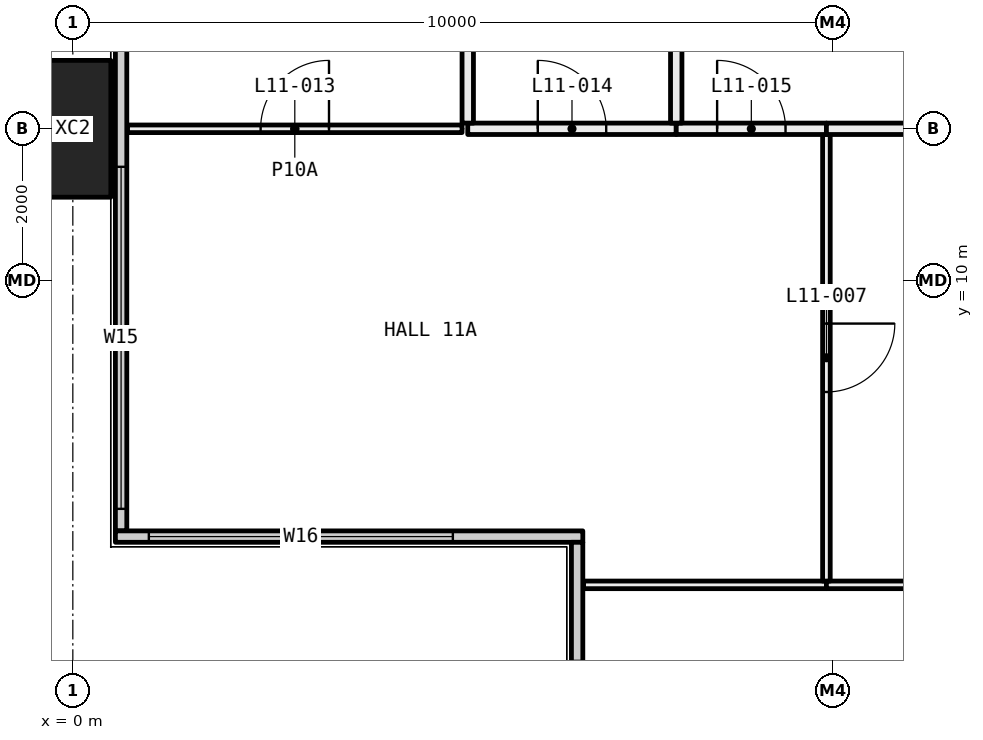
"""IFC4 building model, lengths in metres.
Left out: names, types, materials, properties, quantities, classifications, styles, units other than length and angle.
Written with IfcOpenShell. Run it as: python <this file> out.ifc"""

import sys

from ifc_helpers import new_model, si_unit, direction, frame, frame_2d, origin, origin_2d, place, context, subcontext, project, spatial, rectangle, hollow_rectangle, extrude, element, fill, save


model = new_model("IFC4")
c1 = context("Model", 3, precision=1e-05, world=origin(), true_north=direction((0.0, 1.0)))
c2 = subcontext(c1, "Body", "Model", "MODEL_VIEW")
j1 = project(units=[si_unit("LENGTHUNIT", "METRE"), si_unit("PLANEANGLEUNIT", "RADIAN")], contexts=[c1])
p1 = place(None, origin())
s1 = spatial("IfcSite", under=j1, at=p1, CompositionType="ELEMENT")
p2 = place(p1, origin())
s2 = spatial("IfcBuilding", under=s1, at=p2, CompositionType="ELEMENT")
p3 = place(p2, frame((0.0, 0.0, 50.7)))
s3 = spatial("IfcBuildingStorey", under=s2, at=p3, CompositionType="ELEMENT", Elevation=50.7)
p4 = place(p3, frame((0.0, 12.0, -0.4), z_axis=(0.0, 0.0, 1.0), x_axis=(0.0, 1.0, 0.0)))
e1 = element("IfcColumn", 1, at=p4, inside=s3, PredefinedType="COLUMN", context=c2, shape_type="SweptSolid", body=[
    extrude(hollow_rectangle(XDim=1.8, YDim=1.0, WallThickness=0.07, at=origin_2d()), origin(), (0.0, 0.0, 1.0), 3.45),
])
p5 = place(p3, frame((0.635, 6.71, 0.0), z_axis=(0.0, 0.0, 1.0), x_axis=(0.0, 1.0, 0.0)))
e2 = element("IfcWall", 2, at=p5, inside=s3, PredefinedType="ELEMENTEDWALL", context=c2, shape_type="SweptSolid", body=[
    extrude(rectangle(XDim=34.58, YDim=0.15, at=frame_2d((17.29, 0.0))), origin(), (0.0, 0.0, 1.0), 3.05),
])
p6 = place(p5, frame((0.29, 0.0, 0.45)))
e3 = element("IfcOpeningElement", 3, at=p6, cuts=e2, PredefinedType="OPENING", context=c2, shape_type="SweptSolid", body=[
    extrude(rectangle(XDim=4.5, YDim=2.55, at=frame_2d((2.25, 1.275))), frame((0.0, 0.085, 0.0), z_axis=(0.0, -1.0, 0.0), x_axis=(1.0, 0.0, 0.0)), (0.0, 0.0, 1.0), 0.17),
])
p7 = place(p5, frame((7.79, 0.0, 0.45)))
e4 = element("IfcOpeningElement", 4, at=p7, cuts=e2, PredefinedType="OPENING", context=c2, shape_type="SweptSolid", body=[
    extrude(rectangle(XDim=3.0, YDim=2.55, at=frame_2d((1.5, 1.275))), frame((0.0, 0.085, 0.0), z_axis=(0.0, -1.0, 0.0), x_axis=(1.0, 0.0, 0.0)), (0.0, 0.0, 1.0), 0.17),
])
p8 = place(p5, frame((11.79, 0.0, 0.45)))
e5 = element("IfcOpeningElement", 5, at=p8, cuts=e2, PredefinedType="OPENING", context=c2, shape_type="SweptSolid", body=[
    extrude(rectangle(XDim=3.0, YDim=2.55, at=frame_2d((1.5, 1.275))), frame((0.0, 0.085, 0.0), z_axis=(0.0, -1.0, 0.0), x_axis=(1.0, 0.0, 0.0)), (0.0, 0.0, 1.0), 0.17),
])
p9 = place(p5, frame((19.79, 0.0, 0.45)))
e6 = element("IfcOpeningElement", 6, at=p9, cuts=e2, PredefinedType="OPENING", context=c2, shape_type="SweptSolid", body=[
    extrude(rectangle(XDim=3.0, YDim=2.55, at=frame_2d((1.5, 1.275))), frame((0.0, 0.085, 0.0), z_axis=(0.0, -1.0, 0.0), x_axis=(1.0, 0.0, 0.0)), (0.0, 0.0, 1.0), 0.17),
])
p10 = place(p5, frame((23.79, 0.0, 0.45)))
e7 = element("IfcOpeningElement", 7, at=p10, cuts=e2, PredefinedType="OPENING", context=c2, shape_type="SweptSolid", body=[
    extrude(rectangle(XDim=2.0, YDim=2.55, at=frame_2d((1.0, 1.275))), frame((0.0, 0.085, 0.0), z_axis=(0.0, -1.0, 0.0), x_axis=(1.0, 0.0, 0.0)), (0.0, 0.0, 1.0), 0.17),
])
p11 = place(p5, frame((29.79, 0.0, 0.45)))
e8 = element("IfcOpeningElement", 8, at=p11, cuts=e2, PredefinedType="OPENING", context=c2, shape_type="SweptSolid", body=[
    extrude(rectangle(XDim=4.5, YDim=2.55, at=frame_2d((2.25, 1.275))), frame((0.0, 0.085, 0.0), z_axis=(0.0, -1.0, 0.0), x_axis=(1.0, 0.0, 0.0)), (0.0, 0.0, 1.0), 0.17),
])
p12 = place(p3, frame((0.56, 6.635, 0.0), z_axis=(0.0, 0.0, 1.0), x_axis=(1.0, 0.0, 0.0)))
e9 = element("IfcWall", 9, at=p12, inside=s3, PredefinedType="ELEMENTEDWALL", context=c2, shape_type="SweptSolid", body=[
    extrude(rectangle(XDim=6.15, YDim=0.15, at=frame_2d((3.075, 0.0))), origin(), (0.0, 0.0, 1.0), 3.05),
])
p13 = place(p12, frame((0.44, 0.0, 0.45)))
e10 = element("IfcOpeningElement", 10, at=p13, cuts=e9, PredefinedType="OPENING", context=c2, shape_type="SweptSolid", body=[
    extrude(rectangle(XDim=4.0, YDim=2.55, at=frame_2d((2.0, 1.275))), frame((0.0, 0.085, 0.0), z_axis=(0.0, -1.0, 0.0), x_axis=(1.0, 0.0, 0.0)), (0.0, 0.0, 1.0), 0.17),
])
p14 = place(p3, frame((6.635, 0.71, 0.0), z_axis=(0.0, 0.0, 1.0), x_axis=(0.0, 1.0, 0.0)))
e11 = element("IfcWall", 11, at=p14, inside=s3, PredefinedType="ELEMENTEDWALL", context=c2, shape_type="SweptSolid", body=[
    extrude(rectangle(XDim=5.85, YDim=0.15, at=frame_2d((2.925, 0.0))), origin(), (0.0, 0.0, 1.0), 3.05),
])
p15 = place(p14, frame((0.29, 0.0, 0.45)))
e12 = element("IfcOpeningElement", 12, at=p15, cuts=e11, PredefinedType="OPENING", context=c2, shape_type="SweptSolid", body=[
    extrude(rectangle(XDim=4.0, YDim=2.55, at=frame_2d((2.0, 1.275))), frame((0.0, 0.085, 0.0), z_axis=(0.0, -1.0, 0.0), x_axis=(1.0, 0.0, 0.0)), (0.0, 0.0, 1.0), 0.17),
])
p16 = place(p3, frame((9.915, 6.0, 0.0), z_axis=(0.0, 0.0, 1.0), x_axis=(-1.0, 0.0, 0.0)))
e13 = element("IfcWall", 13, at=p16, inside=s3, PredefinedType="PARTITIONING", context=c2, shape_type="SweptSolid", body=[
    extrude(rectangle(XDim=3.195, YDim=0.1, at=frame_2d((1.598, 0.0))), origin(), (0.0, 0.0, 1.0), 3.05),
])
p17 = place(p3, frame((11.95, 6.0, 0.0), z_axis=(0.0, 0.0, 1.0), x_axis=(-1.0, 0.0, 0.0)))
e14 = element("IfcWall", 14, at=p17, inside=s3, PredefinedType="PARTITIONING", context=c2, shape_type="SweptSolid", body=[
    extrude(rectangle(XDim=2.035, YDim=0.1, at=frame_2d((1.018, 0.0))), origin(), (0.0, 0.0, 1.0), 2.45),
])
p18 = place(p3, frame((9.915, 6.05, 0.0), z_axis=(0.0, 0.0, 1.0), x_axis=(0.0, 1.0, 0.0)))
e15 = element("IfcWall", 15, at=p18, inside=s3, PredefinedType="PARTITIONING", context=c2, shape_type="SweptSolid", body=[
    extrude(rectangle(XDim=5.875, YDim=0.1, at=frame_2d((2.938, 0.0))), origin(), (0.0, 0.0, 1.0), 2.45),
])
p19 = place(p18, frame((2.488, 0.0, 0.0)))
e16 = element("IfcOpeningElement", 16, at=p19, cuts=e15, PredefinedType="OPENING", context=c2, shape_type="SweptSolid", body=[
    extrude(rectangle(XDim=0.9, YDim=2.1, at=frame_2d((0.45, 1.05))), frame((0.0, 0.06, 0.0), z_axis=(0.0, -1.0, 0.0), x_axis=(1.0, 0.0, 0.0)), (0.0, 0.0, 1.0), 0.12),
])
p20 = place(p3, frame((5.121, 12.0, 0.0), z_axis=(0.0, 0.0, 1.0), x_axis=(-1.0, 0.0, 0.0)))
e17 = element("IfcWall", 17, at=p20, inside=s3, PredefinedType="PARTITIONING", context=c2, shape_type="SweptSolid", body=[
    extrude(rectangle(XDim=4.401, YDim=0.1, at=frame_2d((2.201, 0.0))), origin(), (0.0, 0.0, 1.0), 2.45),
])
p21 = place(p20, frame((1.75, 0.0, 0.0)))
e18 = element("IfcOpeningElement", 18, at=p21, cuts=e17, PredefinedType="OPENING", context=c2, shape_type="SweptSolid", body=[
    extrude(rectangle(XDim=0.9, YDim=2.1, at=frame_2d((0.45, 1.05))), frame((0.0, 0.06, 0.0), z_axis=(0.0, -1.0, 0.0), x_axis=(1.0, 0.0, 0.0)), (0.0, 0.0, 1.0), 0.12),
])
p22 = place(p3, frame((7.939, 12.0, 0.0), z_axis=(0.0, 0.0, 1.0), x_axis=(-1.0, 0.0, 0.0)))
e19 = element("IfcWall", 19, at=p22, inside=s3, PredefinedType="PARTITIONING", context=c2, shape_type="SweptSolid", body=[
    extrude(rectangle(XDim=2.743, YDim=0.15, at=frame_2d((1.372, 0.0))), origin(), (0.0, 0.0, 1.0), 2.45),
])
p23 = place(p22, frame((0.921, 0.0, 0.0)))
e20 = element("IfcOpeningElement", 20, at=p23, cuts=e19, PredefinedType="OPENING", context=c2, shape_type="SweptSolid", body=[
    extrude(rectangle(XDim=0.9, YDim=2.1, at=frame_2d((0.45, 1.05))), frame((0.0, 0.085, 0.0), z_axis=(0.0, -1.0, 0.0), x_axis=(1.0, 0.0, 0.0)), (0.0, 0.0, 1.0), 0.17),
])
p24 = place(p3, frame((9.915, 12.0, 0.0), z_axis=(0.0, 0.0, 1.0), x_axis=(-1.0, 0.0, 0.0)))
e21 = element("IfcWall", 21, at=p24, inside=s3, PredefinedType="PARTITIONING", context=c2, shape_type="SweptSolid", body=[
    extrude(rectangle(XDim=1.976, YDim=0.15, at=frame_2d((0.988, 0.0))), origin(), (0.0, 0.0, 1.0), 2.45),
])
p25 = place(p24, frame((0.538, 0.0, 0.0)))
e22 = element("IfcOpeningElement", 22, at=p25, cuts=e21, PredefinedType="OPENING", context=c2, shape_type="SweptSolid", body=[
    extrude(rectangle(XDim=0.9, YDim=2.1, at=frame_2d((0.45, 1.05))), frame((0.0, 0.085, 0.0), z_axis=(0.0, -1.0, 0.0), x_axis=(1.0, 0.0, 0.0)), (0.0, 0.0, 1.0), 0.17),
])
p26 = place(p3, frame((11.2, 12.0, 0.0), z_axis=(0.0, 0.0, 1.0), x_axis=(-1.0, 0.0, 0.0)))
e23 = element("IfcWall", 23, at=p26, inside=s3, PredefinedType="PARTITIONING", context=c2, shape_type="SweptSolid", body=[
    extrude(rectangle(XDim=1.285, YDim=0.15, at=frame_2d((0.643, 0.0))), origin(), (0.0, 0.0, 1.0), 2.45),
])
p27 = place(p3, frame((5.196, 12.075, 0.0), z_axis=(0.0, 0.0, 1.0), x_axis=(0.0, 1.0, 0.0)))
e24 = element("IfcWall", 24, at=p27, inside=s3, PredefinedType="PARTITIONING", context=c2, shape_type="SweptSolid", body=[
    extrude(rectangle(XDim=5.825, YDim=0.15, at=frame_2d((2.913, 0.0))), origin(), (0.0, 0.0, 1.0), 2.45),
])
p28 = place(p3, frame((7.939, 12.075, 0.0), z_axis=(0.0, 0.0, 1.0), x_axis=(0.0, 1.0, 0.0)))
e25 = element("IfcWall", 25, at=p28, inside=s3, PredefinedType="PARTITIONING", context=c2, shape_type="SweptSolid", body=[
    extrude(rectangle(XDim=2.637, YDim=0.15, at=frame_2d((1.318, 0.0))), origin(), (0.0, 0.0, 1.0), 2.45),
])
p29 = place(p6, origin())
e26 = element("IfcWindow", 26, at=p29, inside=s3, PartitioningType="SINGLE_PANEL", PredefinedType="WINDOW", context=c2, shape_type="SweptSolid", body=[
    extrude(rectangle(XDim=4.5, YDim=2.55, at=frame_2d((2.25, 1.275))), frame((0.0, 0.03, 0.0), z_axis=(0.0, -1.0, 0.0), x_axis=(1.0, 0.0, 0.0)), (0.0, 0.0, 1.0), 0.06),
])
fill(e3, e26)
p30 = place(p13, origin())
e27 = element("IfcWindow", 27, at=p30, inside=s3, PartitioningType="SINGLE_PANEL", PredefinedType="WINDOW", context=c2, shape_type="SweptSolid", body=[
    extrude(rectangle(XDim=4.0, YDim=2.55, at=frame_2d((2.0, 1.275))), frame((0.0, 0.03, 0.0), z_axis=(0.0, -1.0, 0.0), x_axis=(1.0, 0.0, 0.0)), (0.0, 0.0, 1.0), 0.06),
])
fill(e10, e27)
p31 = place(p19, frame((0.9, 0.0, 0.0), x_axis=(-1.0, 0.0, 0.0)))
e28 = element("IfcDoor", 28, at=p31, inside=s3, OperationType="SINGLE_SWING_RIGHT", PredefinedType="DOOR", context=c2, shape_type="SweptSolid", body=[
    extrude(rectangle(XDim=0.9, YDim=2.1, at=frame_2d((0.45, 1.05))), frame((0.0, 0.025, 0.0), z_axis=(0.0, -1.0, 0.0), x_axis=(1.0, 0.0, 0.0)), (0.0, 0.0, 1.0), 0.05),
])
fill(e16, e28)
p32 = place(p21, frame((0.9, 0.0, 0.0), x_axis=(-1.0, 0.0, 0.0)))
e29 = element("IfcDoor", 29, at=p32, inside=s3, OperationType="SINGLE_SWING_LEFT", PredefinedType="DOOR", context=c2, shape_type="SweptSolid", body=[
    extrude(rectangle(XDim=0.9, YDim=2.1, at=frame_2d((0.45, 1.05))), frame((0.0, 0.025, 0.0), z_axis=(0.0, -1.0, 0.0), x_axis=(1.0, 0.0, 0.0)), (0.0, 0.0, 1.0), 0.05),
])
fill(e18, e29)
p33 = place(p23, frame((0.9, 0.0, 0.0), x_axis=(-1.0, 0.0, 0.0)))
e30 = element("IfcDoor", 30, at=p33, inside=s3, OperationType="SINGLE_SWING_RIGHT", PredefinedType="DOOR", context=c2, shape_type="SweptSolid", body=[
    extrude(rectangle(XDim=0.9, YDim=2.1, at=frame_2d((0.45, 1.05))), frame((0.0, 0.025, 0.0), z_axis=(0.0, -1.0, 0.0), x_axis=(1.0, 0.0, 0.0)), (0.0, 0.0, 1.0), 0.05),
])
fill(e20, e30)
p34 = place(p25, frame((0.9, 0.0, 0.0), x_axis=(-1.0, 0.0, 0.0)))
e31 = element("IfcDoor", 31, at=p34, inside=s3, OperationType="SINGLE_SWING_RIGHT", PredefinedType="DOOR", context=c2, shape_type="SweptSolid", body=[
    extrude(rectangle(XDim=0.9, YDim=2.1, at=frame_2d((0.45, 1.05))), frame((0.0, 0.025, 0.0), z_axis=(0.0, -1.0, 0.0), x_axis=(1.0, 0.0, 0.0)), (0.0, 0.0, 1.0), 0.05),
])
fill(e22, e31)
save(model, sys.argv[1])
